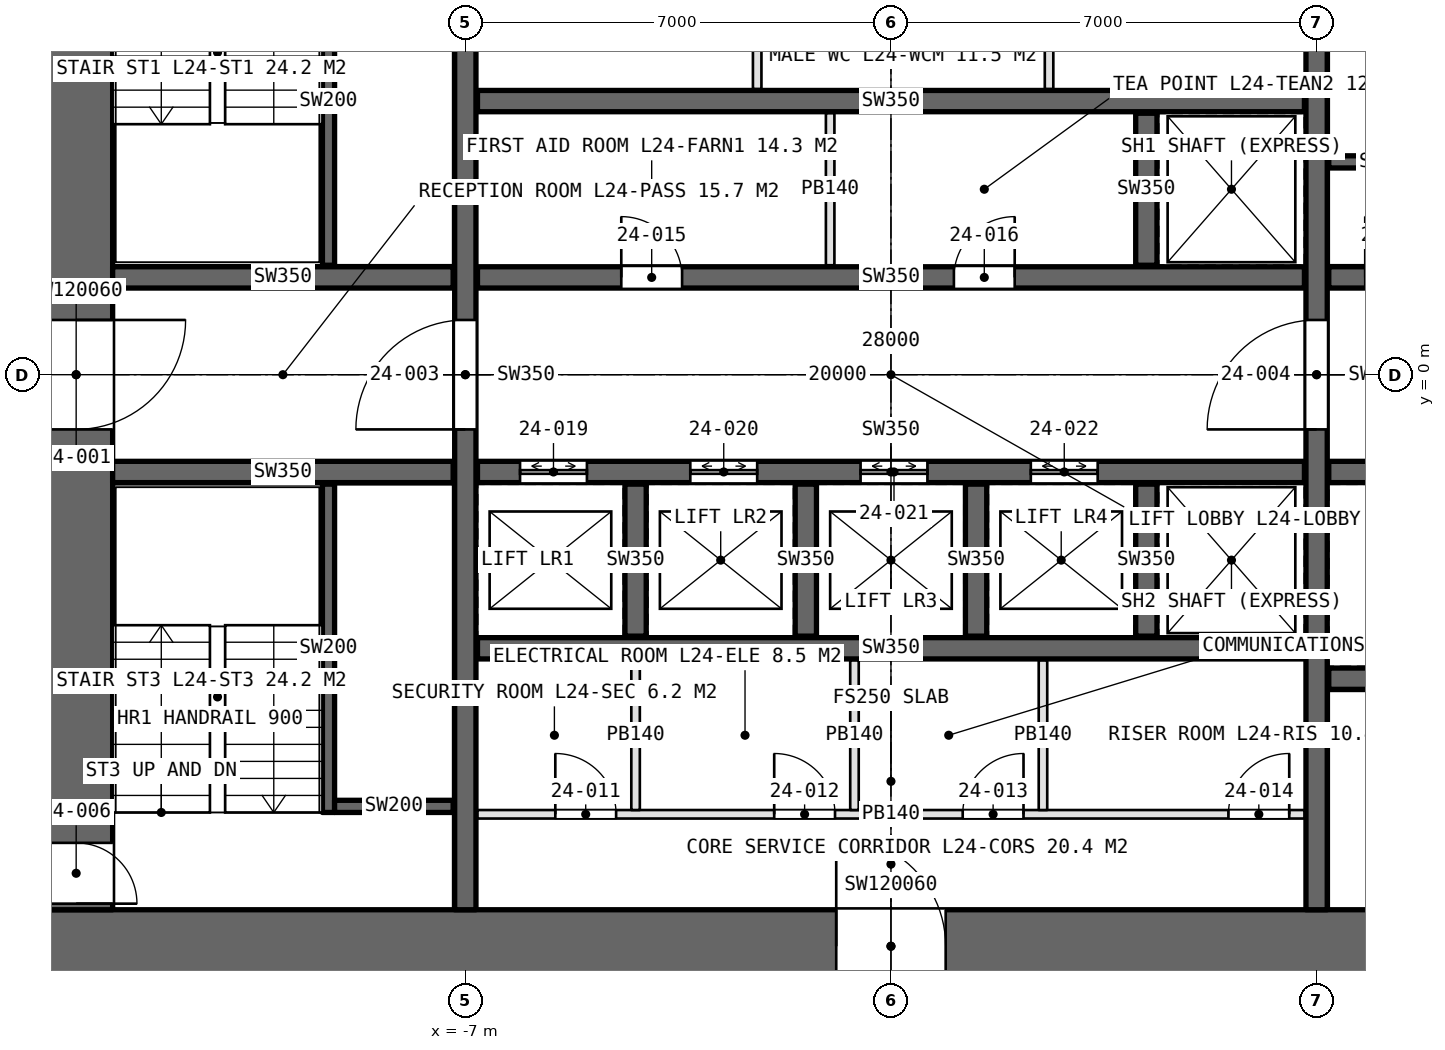
"""IFC4 building model, lengths in metres.
Left out: names, types, materials, properties, quantities, classifications, styles, units other than length and angle.
Written with IfcOpenShell. Run it as: python <this file> out.ifc"""

import sys

from ifc_helpers import new_model, si_unit, direction, frame, frame_2d, origin, place, context, subcontext, project, spatial, rectangle, extrude, element, fill, save


model = new_model("IFC4")
c1 = context("Model", 3, precision=1e-05, world=origin(), true_north=direction((0.0, 1.0)))
c2 = subcontext(c1, "Body", "Model", "MODEL_VIEW")
j1 = project(units=[si_unit("LENGTHUNIT", "METRE"), si_unit("PLANEANGLEUNIT", "RADIAN")], contexts=[c1])
p1 = place(None, origin())
s1 = spatial("IfcSite", under=j1, at=p1, CompositionType="ELEMENT")
p2 = place(p1, origin())
s2 = spatial("IfcBuilding", under=s1, at=p2, CompositionType="ELEMENT")
p3 = place(p2, frame((0.0, 0.0, 117.6)))
s3 = spatial("IfcBuildingStorey", under=s2, at=p3, CompositionType="ELEMENT", Elevation=117.6)
p4 = place(p3, frame((-14.0, -9.4, 0.0), z_axis=(0.0, 0.0, 1.0), x_axis=(1.0, 0.0, 0.0)))
e1 = element("IfcWall", 1, at=p4, inside=s3, PredefinedType="SHEAR", context=c2, shape_type="SweptSolid", body=[
    extrude(rectangle(XDim=28.0, YDim=1.2, at=frame_2d((14.0, 0.0))), origin(), (0.0, 0.0, 1.0), 4.2),
])
p5 = place(p4, frame((13.1, 0.0, 0.0)))
e2 = element("IfcOpeningElement", 2, at=p5, cuts=e1, PredefinedType="OPENING", context=c2, shape_type="SweptSolid", body=[
    extrude(rectangle(XDim=1.8, YDim=2.4, at=frame_2d((0.9, 1.2))), frame((0.0, 0.61, 0.0), z_axis=(0.0, -1.0, 0.0), x_axis=(1.0, 0.0, 0.0)), (0.0, 0.0, 1.0), 1.22),
])
p6 = place(p4, frame((22.9, 0.0, 0.0)))
e3 = element("IfcOpeningElement", 3, at=p6, cuts=e1, PredefinedType="OPENING", context=c2, shape_type="SweptSolid", body=[
    extrude(rectangle(XDim=2.2, YDim=2.7, at=frame_2d((1.1, 1.35))), frame((0.0, 0.61, 0.0), z_axis=(0.0, -1.0, 0.0), x_axis=(1.0, 0.0, 0.0)), (0.0, 0.0, 1.0), 1.22),
])
p7 = place(p3, frame((-13.4, 8.8, 0.0), z_axis=(0.0, 0.0, 1.0), x_axis=(0.0, -1.0, 0.0)))
e4 = element("IfcWall", 4, at=p7, inside=s3, PredefinedType="SHEAR", context=c2, shape_type="SweptSolid", body=[
    extrude(rectangle(XDim=17.6, YDim=1.2, at=frame_2d((8.8, 0.0))), origin(), (0.0, 0.0, 1.0), 4.2),
])
p8 = place(p7, frame((7.9, 0.0, 0.0)))
e5 = element("IfcOpeningElement", 5, at=p8, cuts=e4, PredefinedType="OPENING", context=c2, shape_type="SweptSolid", body=[
    extrude(rectangle(XDim=1.8, YDim=2.4, at=frame_2d((0.9, 1.2))), frame((0.0, 0.61, 0.0), z_axis=(0.0, -1.0, 0.0), x_axis=(1.0, 0.0, 0.0)), (0.0, 0.0, 1.0), 1.22),
])
p9 = place(p7, frame((16.5, 0.0, 0.0)))
e6 = element("IfcOpeningElement", 6, at=p9, cuts=e4, PredefinedType="OPENING", context=c2, shape_type="SweptSolid", body=[
    extrude(rectangle(XDim=1.0, YDim=2.4, at=frame_2d((0.5, 1.2))), frame((0.0, 0.61, 0.0), z_axis=(0.0, -1.0, 0.0), x_axis=(1.0, 0.0, 0.0)), (0.0, 0.0, 1.0), 1.22),
])
p10 = place(p3, frame((-7.0, -8.8, 0.0), z_axis=(0.0, 0.0, 1.0), x_axis=(0.0, 1.0, 0.0)))
e7 = element("IfcWall", 7, at=p10, inside=s3, PredefinedType="SHEAR", context=c2, shape_type="SweptSolid", body=[
    extrude(rectangle(XDim=17.6, YDim=0.35, at=frame_2d((8.8, 0.0))), origin(), (0.0, 0.0, 1.0), 4.2),
])
p11 = place(p10, frame((7.9, 0.0, 0.0)))
e8 = element("IfcOpeningElement", 8, at=p11, cuts=e7, PredefinedType="OPENING", context=c2, shape_type="SweptSolid", body=[
    extrude(rectangle(XDim=1.8, YDim=2.4, at=frame_2d((0.9, 1.2))), frame((0.0, 0.185, 0.0), z_axis=(0.0, -1.0, 0.0), x_axis=(1.0, 0.0, 0.0)), (0.0, 0.0, 1.0), 0.37),
])
p12 = place(p3, frame((7.0, -8.8, 0.0), z_axis=(0.0, 0.0, 1.0), x_axis=(0.0, 1.0, 0.0)))
e9 = element("IfcWall", 9, at=p12, inside=s3, PredefinedType="SHEAR", context=c2, shape_type="SweptSolid", body=[
    extrude(rectangle(XDim=17.6, YDim=0.35, at=frame_2d((8.8, 0.0))), origin(), (0.0, 0.0, 1.0), 4.2),
])
p13 = place(p12, frame((7.9, 0.0, 0.0)))
e10 = element("IfcOpeningElement", 10, at=p13, cuts=e9, PredefinedType="OPENING", context=c2, shape_type="SweptSolid", body=[
    extrude(rectangle(XDim=1.8, YDim=2.4, at=frame_2d((0.9, 1.2))), frame((0.0, 0.185, 0.0), z_axis=(0.0, -1.0, 0.0), x_axis=(1.0, 0.0, 0.0)), (0.0, 0.0, 1.0), 0.37),
])
p14 = place(p3, frame((-6.8, 1.6, 0.0), z_axis=(0.0, 0.0, 1.0), x_axis=(1.0, 0.0, 0.0)))
e11 = element("IfcWall", 11, at=p14, inside=s3, PredefinedType="SHEAR", context=c2, shape_type="SweptSolid", body=[
    extrude(rectangle(XDim=13.6, YDim=0.35, at=frame_2d((6.8, 0.0))), origin(), (0.0, 0.0, 1.0), 4.2),
])
p15 = place(p14, frame((2.365, 0.0, 0.0)))
e12 = element("IfcOpeningElement", 12, at=p15, cuts=e11, PredefinedType="OPENING", context=c2, shape_type="SweptSolid", body=[
    extrude(rectangle(XDim=1.0, YDim=2.4, at=frame_2d((0.5, 1.2))), frame((0.0, 0.185, 0.0), z_axis=(0.0, -1.0, 0.0), x_axis=(1.0, 0.0, 0.0)), (0.0, 0.0, 1.0), 0.37),
])
p16 = place(p14, frame((7.835, 0.0, 0.0)))
e13 = element("IfcOpeningElement", 13, at=p16, cuts=e11, PredefinedType="OPENING", context=c2, shape_type="SweptSolid", body=[
    extrude(rectangle(XDim=1.0, YDim=2.4, at=frame_2d((0.5, 1.2))), frame((0.0, 0.185, 0.0), z_axis=(0.0, -1.0, 0.0), x_axis=(1.0, 0.0, 0.0)), (0.0, 0.0, 1.0), 0.37),
])
p17 = place(p3, frame((-6.8, -1.6, 0.0), z_axis=(0.0, 0.0, 1.0), x_axis=(1.0, 0.0, 0.0)))
e14 = element("IfcWall", 14, at=p17, inside=s3, PredefinedType="SHEAR", context=c2, shape_type="SweptSolid", body=[
    extrude(rectangle(XDim=13.6, YDim=0.35, at=frame_2d((6.8, 0.0))), origin(), (0.0, 0.0, 1.0), 4.2),
])
p18 = place(p17, frame((0.7, 0.0, 0.0)))
e15 = element("IfcOpeningElement", 15, at=p18, cuts=e14, PredefinedType="OPENING", context=c2, shape_type="SweptSolid", body=[
    extrude(rectangle(XDim=1.1, YDim=2.4, at=frame_2d((0.55, 1.2))), frame((0.0, 0.185, 0.0), z_axis=(0.0, -1.0, 0.0), x_axis=(1.0, 0.0, 0.0)), (0.0, 0.0, 1.0), 0.37),
])
p19 = place(p17, frame((3.5, 0.0, 0.0)))
e16 = element("IfcOpeningElement", 16, at=p19, cuts=e14, PredefinedType="OPENING", context=c2, shape_type="SweptSolid", body=[
    extrude(rectangle(XDim=1.1, YDim=2.4, at=frame_2d((0.55, 1.2))), frame((0.0, 0.185, 0.0), z_axis=(0.0, -1.0, 0.0), x_axis=(1.0, 0.0, 0.0)), (0.0, 0.0, 1.0), 0.37),
])
p20 = place(p17, frame((6.3, 0.0, 0.0)))
e17 = element("IfcOpeningElement", 17, at=p20, cuts=e14, PredefinedType="OPENING", context=c2, shape_type="SweptSolid", body=[
    extrude(rectangle(XDim=1.1, YDim=2.4, at=frame_2d((0.55, 1.2))), frame((0.0, 0.185, 0.0), z_axis=(0.0, -1.0, 0.0), x_axis=(1.0, 0.0, 0.0)), (0.0, 0.0, 1.0), 0.37),
])
p21 = place(p17, frame((9.1, 0.0, 0.0)))
e18 = element("IfcOpeningElement", 18, at=p21, cuts=e14, PredefinedType="OPENING", context=c2, shape_type="SweptSolid", body=[
    extrude(rectangle(XDim=1.1, YDim=2.4, at=frame_2d((0.55, 1.2))), frame((0.0, 0.185, 0.0), z_axis=(0.0, -1.0, 0.0), x_axis=(1.0, 0.0, 0.0)), (0.0, 0.0, 1.0), 0.37),
])
for number, where, z_axis, x_axis in (
    (19, (-6.8, 4.5, 0.0), (0.0, 0.0, 1.0), (1.0, 0.0, 0.0)),
    (20, (-6.8, -4.5, 0.0), (0.0, 0.0, 1.0), (1.0, 0.0, 0.0)),
):
    element("IfcWall", number, at=place(p3, frame(where, z_axis=z_axis, x_axis=x_axis)), inside=s3, PredefinedType="SHEAR", context=c2, shape_type="SweptSolid", body=[
        extrude(rectangle(XDim=13.6, YDim=0.35, at=frame_2d((6.8, 0.0))), origin(), (0.0, 0.0, 1.0), 4.2),
    ])
for number, where, z_axis, x_axis in (
    (21, (-12.8, 1.6, 0.0), (0.0, 0.0, 1.0), (1.0, 0.0, 0.0)),
    (22, (-12.8, -1.6, 0.0), (0.0, 0.0, 1.0), (1.0, 0.0, 0.0)),
):
    element("IfcWall", number, at=place(p3, frame(where, z_axis=z_axis, x_axis=x_axis)), inside=s3, PredefinedType="SHEAR", context=c2, shape_type="SweptSolid", body=[
        extrude(rectangle(XDim=5.6, YDim=0.35, at=frame_2d((2.8, 0.0))), origin(), (0.0, 0.0, 1.0), 4.2),
    ])
p22 = place(p3, frame((7.2, 1.6, 0.0), z_axis=(0.0, 0.0, 1.0), x_axis=(1.0, 0.0, 0.0)))
e23 = element("IfcWall", 23, at=p22, inside=s3, PredefinedType="SHEAR", context=c2, shape_type="SweptSolid", body=[
    extrude(rectangle(XDim=5.6, YDim=0.35, at=frame_2d((2.8, 0.0))), origin(), (0.0, 0.0, 1.0), 4.2),
])
p23 = place(p22, frame((0.6, 0.0, 0.0)))
e24 = element("IfcOpeningElement", 24, at=p23, cuts=e23, PredefinedType="OPENING", context=c2, shape_type="SweptSolid", body=[
    extrude(rectangle(XDim=1.0, YDim=2.4, at=frame_2d((0.5, 1.2))), frame((0.0, 0.185, 0.0), z_axis=(0.0, -1.0, 0.0), x_axis=(1.0, 0.0, 0.0)), (0.0, 0.0, 1.0), 0.37),
])
p24 = place(p3, frame((7.2, -1.6, 0.0), z_axis=(0.0, 0.0, 1.0), x_axis=(1.0, 0.0, 0.0)))
e25 = element("IfcWall", 25, at=p24, inside=s3, PredefinedType="SHEAR", context=c2, shape_type="SweptSolid", body=[
    extrude(rectangle(XDim=5.6, YDim=0.35, at=frame_2d((2.8, 0.0))), origin(), (0.0, 0.0, 1.0), 4.2),
])
p25 = place(p24, frame((0.9, 0.0, 0.0)))
e26 = element("IfcOpeningElement", 26, at=p25, cuts=e25, PredefinedType="OPENING", context=c2, shape_type="SweptSolid", body=[
    extrude(rectangle(XDim=1.3, YDim=2.4, at=frame_2d((0.65, 1.2))), frame((0.0, 0.185, 0.0), z_axis=(0.0, -1.0, 0.0), x_axis=(1.0, 0.0, 0.0)), (0.0, 0.0, 1.0), 0.37),
])
p26 = place(p24, frame((3.9, 0.0, 0.0)))
e27 = element("IfcOpeningElement", 27, at=p26, cuts=e25, PredefinedType="OPENING", context=c2, shape_type="SweptSolid", body=[
    extrude(rectangle(XDim=1.3, YDim=2.4, at=frame_2d((0.65, 1.2))), frame((0.0, 0.185, 0.0), z_axis=(0.0, -1.0, 0.0), x_axis=(1.0, 0.0, 0.0)), (0.0, 0.0, 1.0), 0.37),
])
p27 = place(p3, frame((7.2, -5.0, 0.0), z_axis=(0.0, 0.0, 1.0), x_axis=(1.0, 0.0, 0.0)))
e28 = element("IfcWall", 28, at=p27, inside=s3, PredefinedType="SHEAR", context=c2, shape_type="SweptSolid", body=[
    extrude(rectangle(XDim=5.6, YDim=0.35, at=frame_2d((2.8, 0.0))), origin(), (0.0, 0.0, 1.0), 4.2),
])
for number, where, z_axis, x_axis in (
    (29, (-4.2, -4.3, 0.0), (0.0, 0.0, 1.0), (0.0, 1.0, 0.0)),
    (30, (-1.4, -4.3, 0.0), (0.0, 0.0, 1.0), (0.0, 1.0, 0.0)),
    (31, (1.4, -4.3, 0.0), (0.0, 0.0, 1.0), (0.0, 1.0, 0.0)),
    (32, (4.2, 1.8, 0.0), (0.0, 0.0, 1.0), (0.0, 1.0, 0.0)),
    (33, (4.2, -4.3, 0.0), (0.0, 0.0, 1.0), (0.0, 1.0, 0.0)),
):
    element("IfcWall", number, at=place(p3, frame(where, z_axis=z_axis, x_axis=x_axis)), inside=s3, PredefinedType="SHEAR", context=c2, shape_type="SweptSolid", body=[
        extrude(rectangle(XDim=2.5, YDim=0.35, at=frame_2d((1.25, 0.0))), origin(), (0.0, 0.0, 1.0), 4.2),
    ])
for number, where, z_axis, x_axis in (
    (34, (-2.2, 4.7, 0.0), (0.0, 0.0, 1.0), (0.0, 1.0, 0.0)),
    (35, (2.6, 4.7, 0.0), (0.0, 0.0, 1.0), (0.0, 1.0, 0.0)),
):
    element("IfcWall", number, at=place(p3, frame(where, z_axis=z_axis, x_axis=x_axis)), inside=s3, PredefinedType="PARTITIONING", context=c2, shape_type="SweptSolid", body=[
        extrude(rectangle(XDim=2.46, YDim=0.14, at=frame_2d((1.23, 0.0))), origin(), (0.0, 0.0, 1.0), 3.95),
    ])
p28 = place(p3, frame((-6.8, -7.23, 0.0), z_axis=(0.0, 0.0, 1.0), x_axis=(1.0, 0.0, 0.0)))
e36 = element("IfcWall", 36, at=p28, inside=s3, PredefinedType="PARTITIONING", context=c2, shape_type="SweptSolid", body=[
    extrude(rectangle(XDim=13.6, YDim=0.14, at=frame_2d((6.8, 0.0))), origin(), (0.0, 0.0, 1.0), 3.95),
])
p29 = place(p28, frame((1.28, 0.0, 0.0)))
e37 = element("IfcOpeningElement", 37, at=p29, cuts=e36, PredefinedType="OPENING", context=c2, shape_type="SweptSolid", body=[
    extrude(rectangle(XDim=1.0, YDim=2.4, at=frame_2d((0.5, 1.2))), frame((0.0, 0.08, 0.0), z_axis=(0.0, -1.0, 0.0), x_axis=(1.0, 0.0, 0.0)), (0.0, 0.0, 1.0), 0.16),
])
p30 = place(p28, frame((4.88, 0.0, 0.0)))
e38 = element("IfcOpeningElement", 38, at=p30, cuts=e36, PredefinedType="OPENING", context=c2, shape_type="SweptSolid", body=[
    extrude(rectangle(XDim=1.0, YDim=2.4, at=frame_2d((0.5, 1.2))), frame((0.0, 0.08, 0.0), z_axis=(0.0, -1.0, 0.0), x_axis=(1.0, 0.0, 0.0)), (0.0, 0.0, 1.0), 0.16),
])
p31 = place(p28, frame((7.98, 0.0, 0.0)))
e39 = element("IfcOpeningElement", 39, at=p31, cuts=e36, PredefinedType="OPENING", context=c2, shape_type="SweptSolid", body=[
    extrude(rectangle(XDim=1.0, YDim=2.4, at=frame_2d((0.5, 1.2))), frame((0.0, 0.08, 0.0), z_axis=(0.0, -1.0, 0.0), x_axis=(1.0, 0.0, 0.0)), (0.0, 0.0, 1.0), 0.16),
])
p32 = place(p28, frame((12.35, 0.0, 0.0)))
e40 = element("IfcOpeningElement", 40, at=p32, cuts=e36, PredefinedType="OPENING", context=c2, shape_type="SweptSolid", body=[
    extrude(rectangle(XDim=1.0, YDim=2.4, at=frame_2d((0.5, 1.2))), frame((0.0, 0.08, 0.0), z_axis=(0.0, -1.0, 0.0), x_axis=(1.0, 0.0, 0.0)), (0.0, 0.0, 1.0), 0.16),
])
for number, where, z_axis, x_axis in (
    (41, (-4.2, -4.7, 0.0), (0.0, 0.0, 1.0), (0.0, -1.0, 0.0)),
    (42, (-0.6, -4.7, 0.0), (0.0, 0.0, 1.0), (0.0, -1.0, 0.0)),
    (43, (2.5, -4.7, 0.0), (0.0, 0.0, 1.0), (0.0, -1.0, 0.0)),
):
    element("IfcWall", number, at=place(p3, frame(where, z_axis=z_axis, x_axis=x_axis)), inside=s3, PredefinedType="PARTITIONING", context=c2, shape_type="SweptSolid", body=[
        extrude(rectangle(XDim=2.46, YDim=0.14, at=frame_2d((1.23, 0.0))), origin(), (0.0, 0.0, 1.0), 3.95),
    ])
p33 = place(p3, frame((-1.0, 1.8, 0.0), z_axis=(0.0, 0.0, 1.0), x_axis=(0.0, 1.0, 0.0)))
e44 = element("IfcWall", 44, at=p33, inside=s3, PredefinedType="PARTITIONING", context=c2, shape_type="SweptSolid", body=[
    extrude(rectangle(XDim=2.5, YDim=0.14, at=frame_2d((1.25, 0.0))), origin(), (0.0, 0.0, 1.0), 3.95),
])
for number, where, z_axis, x_axis in (
    (45, (-9.25, 7.2, 0.0), (0.0, 0.0, 1.0), (0.0, -1.0, 0.0)),
    (46, (-9.25, -7.2, 0.0), (0.0, 0.0, 1.0), (0.0, 1.0, 0.0)),
):
    element("IfcWall", number, at=place(p3, frame(where, z_axis=z_axis, x_axis=x_axis)), inside=s3, PredefinedType="SOLIDWALL", context=c2, shape_type="SweptSolid", body=[
        extrude(rectangle(XDim=5.4, YDim=0.2, at=frame_2d((2.7, 0.0))), origin(), (0.0, 0.0, 1.0), 4.2),
    ])
for number, where, z_axis, x_axis in (
    (47, (-9.15, -7.1, 0.0), (0.0, 0.0, 1.0), (1.0, 0.0, 0.0)),
    (48, (9.15, 3.5, 0.0), (0.0, 0.0, 1.0), (-1.0, 0.0, 0.0)),
):
    element("IfcWall", number, at=place(p3, frame(where, z_axis=z_axis, x_axis=x_axis)), inside=s3, PredefinedType="SOLIDWALL", context=c2, shape_type="SweptSolid", body=[
        extrude(rectangle(XDim=1.95, YDim=0.2, at=frame_2d((0.975, 0.0))), origin(), (0.0, 0.0, 1.0), 4.2),
    ])
p34 = place(p8, origin())
e49 = element("IfcDoor", 49, at=p34, inside=s3, OperationType="DOUBLE_DOOR_SINGLE_SWING", PredefinedType="DOOR", context=c2, shape_type="SweptSolid", body=[
    extrude(rectangle(XDim=1.8, YDim=2.4, at=frame_2d((0.9, 1.2))), frame((0.0, 0.025, 0.0), z_axis=(0.0, -1.0, 0.0), x_axis=(1.0, 0.0, 0.0)), (0.0, 0.0, 1.0), 0.05),
])
fill(e5, e49)
p35 = place(p11, origin())
e50 = element("IfcDoor", 50, at=p35, inside=s3, OperationType="DOUBLE_DOOR_SINGLE_SWING", PredefinedType="DOOR", context=c2, shape_type="SweptSolid", body=[
    extrude(rectangle(XDim=1.8, YDim=2.4, at=frame_2d((0.9, 1.2))), frame((0.0, 0.025, 0.0), z_axis=(0.0, -1.0, 0.0), x_axis=(1.0, 0.0, 0.0)), (0.0, 0.0, 1.0), 0.05),
])
fill(e8, e50)
p36 = place(p13, origin())
e51 = element("IfcDoor", 51, at=p36, inside=s3, OperationType="DOUBLE_DOOR_SINGLE_SWING", PredefinedType="DOOR", context=c2, shape_type="SweptSolid", body=[
    extrude(rectangle(XDim=1.8, YDim=2.4, at=frame_2d((0.9, 1.2))), frame((0.0, 0.025, 0.0), z_axis=(0.0, -1.0, 0.0), x_axis=(1.0, 0.0, 0.0)), (0.0, 0.0, 1.0), 0.05),
])
fill(e10, e51)
p37 = place(p9, origin())
e52 = element("IfcDoor", 52, at=p37, inside=s3, OperationType="SINGLE_SWING_RIGHT", PredefinedType="DOOR", context=c2, shape_type="SweptSolid", body=[
    extrude(rectangle(XDim=1.0, YDim=2.4, at=frame_2d((0.5, 1.2))), frame((0.0, 0.025, 0.0), z_axis=(0.0, -1.0, 0.0), x_axis=(1.0, 0.0, 0.0)), (0.0, 0.0, 1.0), 0.05),
])
fill(e6, e52)
p38 = place(p29, origin())
e53 = element("IfcDoor", 53, at=p38, inside=s3, OperationType="SINGLE_SWING_LEFT", PredefinedType="DOOR", context=c2, shape_type="SweptSolid", body=[
    extrude(rectangle(XDim=1.0, YDim=2.4, at=frame_2d((0.5, 1.2))), frame((0.0, 0.025, 0.0), z_axis=(0.0, -1.0, 0.0), x_axis=(1.0, 0.0, 0.0)), (0.0, 0.0, 1.0), 0.05),
])
fill(e37, e53)
p39 = place(p30, origin())
e54 = element("IfcDoor", 54, at=p39, inside=s3, OperationType="SINGLE_SWING_LEFT", PredefinedType="DOOR", context=c2, shape_type="SweptSolid", body=[
    extrude(rectangle(XDim=1.0, YDim=2.4, at=frame_2d((0.5, 1.2))), frame((0.0, 0.025, 0.0), z_axis=(0.0, -1.0, 0.0), x_axis=(1.0, 0.0, 0.0)), (0.0, 0.0, 1.0), 0.05),
])
fill(e38, e54)
p40 = place(p31, origin())
e55 = element("IfcDoor", 55, at=p40, inside=s3, OperationType="SINGLE_SWING_RIGHT", PredefinedType="DOOR", context=c2, shape_type="SweptSolid", body=[
    extrude(rectangle(XDim=1.0, YDim=2.4, at=frame_2d((0.5, 1.2))), frame((0.0, 0.025, 0.0), z_axis=(0.0, -1.0, 0.0), x_axis=(1.0, 0.0, 0.0)), (0.0, 0.0, 1.0), 0.05),
])
fill(e39, e55)
p41 = place(p32, origin())
e56 = element("IfcDoor", 56, at=p41, inside=s3, OperationType="SINGLE_SWING_RIGHT", PredefinedType="DOOR", context=c2, shape_type="SweptSolid", body=[
    extrude(rectangle(XDim=1.0, YDim=2.4, at=frame_2d((0.5, 1.2))), frame((0.0, 0.025, 0.0), z_axis=(0.0, -1.0, 0.0), x_axis=(1.0, 0.0, 0.0)), (0.0, 0.0, 1.0), 0.05),
])
fill(e40, e56)
p42 = place(p15, origin())
e57 = element("IfcDoor", 57, at=p42, inside=s3, OperationType="SINGLE_SWING_LEFT", PredefinedType="DOOR", context=c2, shape_type="SweptSolid", body=[
    extrude(rectangle(XDim=1.0, YDim=2.4, at=frame_2d((0.5, 1.2))), frame((0.0, 0.025, 0.0), z_axis=(0.0, -1.0, 0.0), x_axis=(1.0, 0.0, 0.0)), (0.0, 0.0, 1.0), 0.05),
])
fill(e12, e57)
p43 = place(p16, origin())
e58 = element("IfcDoor", 58, at=p43, inside=s3, OperationType="SINGLE_SWING_RIGHT", PredefinedType="DOOR", context=c2, shape_type="SweptSolid", body=[
    extrude(rectangle(XDim=1.0, YDim=2.4, at=frame_2d((0.5, 1.2))), frame((0.0, 0.025, 0.0), z_axis=(0.0, -1.0, 0.0), x_axis=(1.0, 0.0, 0.0)), (0.0, 0.0, 1.0), 0.05),
])
fill(e13, e58)
p44 = place(p5, origin())
e59 = element("IfcDoor", 59, at=p44, inside=s3, OperationType="DOUBLE_DOOR_SINGLE_SWING", PredefinedType="DOOR", context=c2, shape_type="SweptSolid", body=[
    extrude(rectangle(XDim=1.8, YDim=2.4, at=frame_2d((0.9, 1.2))), frame((0.0, 0.025, 0.0), z_axis=(0.0, -1.0, 0.0), x_axis=(1.0, 0.0, 0.0)), (0.0, 0.0, 1.0), 0.05),
])
fill(e2, e59)
p45 = place(p18, origin())
e60 = element("IfcDoor", 60, at=p45, inside=s3, OperationType="DOUBLE_DOOR_SLIDING", PredefinedType="DOOR", context=c2, shape_type="SweptSolid", body=[
    extrude(rectangle(XDim=1.1, YDim=2.4, at=frame_2d((0.55, 1.2))), frame((0.0, 0.025, 0.0), z_axis=(0.0, -1.0, 0.0), x_axis=(1.0, 0.0, 0.0)), (0.0, 0.0, 1.0), 0.05),
])
fill(e15, e60)
p46 = place(p19, origin())
e61 = element("IfcDoor", 61, at=p46, inside=s3, OperationType="DOUBLE_DOOR_SLIDING", PredefinedType="DOOR", context=c2, shape_type="SweptSolid", body=[
    extrude(rectangle(XDim=1.1, YDim=2.4, at=frame_2d((0.55, 1.2))), frame((0.0, 0.025, 0.0), z_axis=(0.0, -1.0, 0.0), x_axis=(1.0, 0.0, 0.0)), (0.0, 0.0, 1.0), 0.05),
])
fill(e16, e61)
p47 = place(p20, origin())
e62 = element("IfcDoor", 62, at=p47, inside=s3, OperationType="DOUBLE_DOOR_SLIDING", PredefinedType="DOOR", context=c2, shape_type="SweptSolid", body=[
    extrude(rectangle(XDim=1.1, YDim=2.4, at=frame_2d((0.55, 1.2))), frame((0.0, 0.025, 0.0), z_axis=(0.0, -1.0, 0.0), x_axis=(1.0, 0.0, 0.0)), (0.0, 0.0, 1.0), 0.05),
])
fill(e17, e62)
p48 = place(p21, origin())
e63 = element("IfcDoor", 63, at=p48, inside=s3, OperationType="DOUBLE_DOOR_SLIDING", PredefinedType="DOOR", context=c2, shape_type="SweptSolid", body=[
    extrude(rectangle(XDim=1.1, YDim=2.4, at=frame_2d((0.55, 1.2))), frame((0.0, 0.025, 0.0), z_axis=(0.0, -1.0, 0.0), x_axis=(1.0, 0.0, 0.0)), (0.0, 0.0, 1.0), 0.05),
])
fill(e18, e63)
save(model, sys.argv[1])
